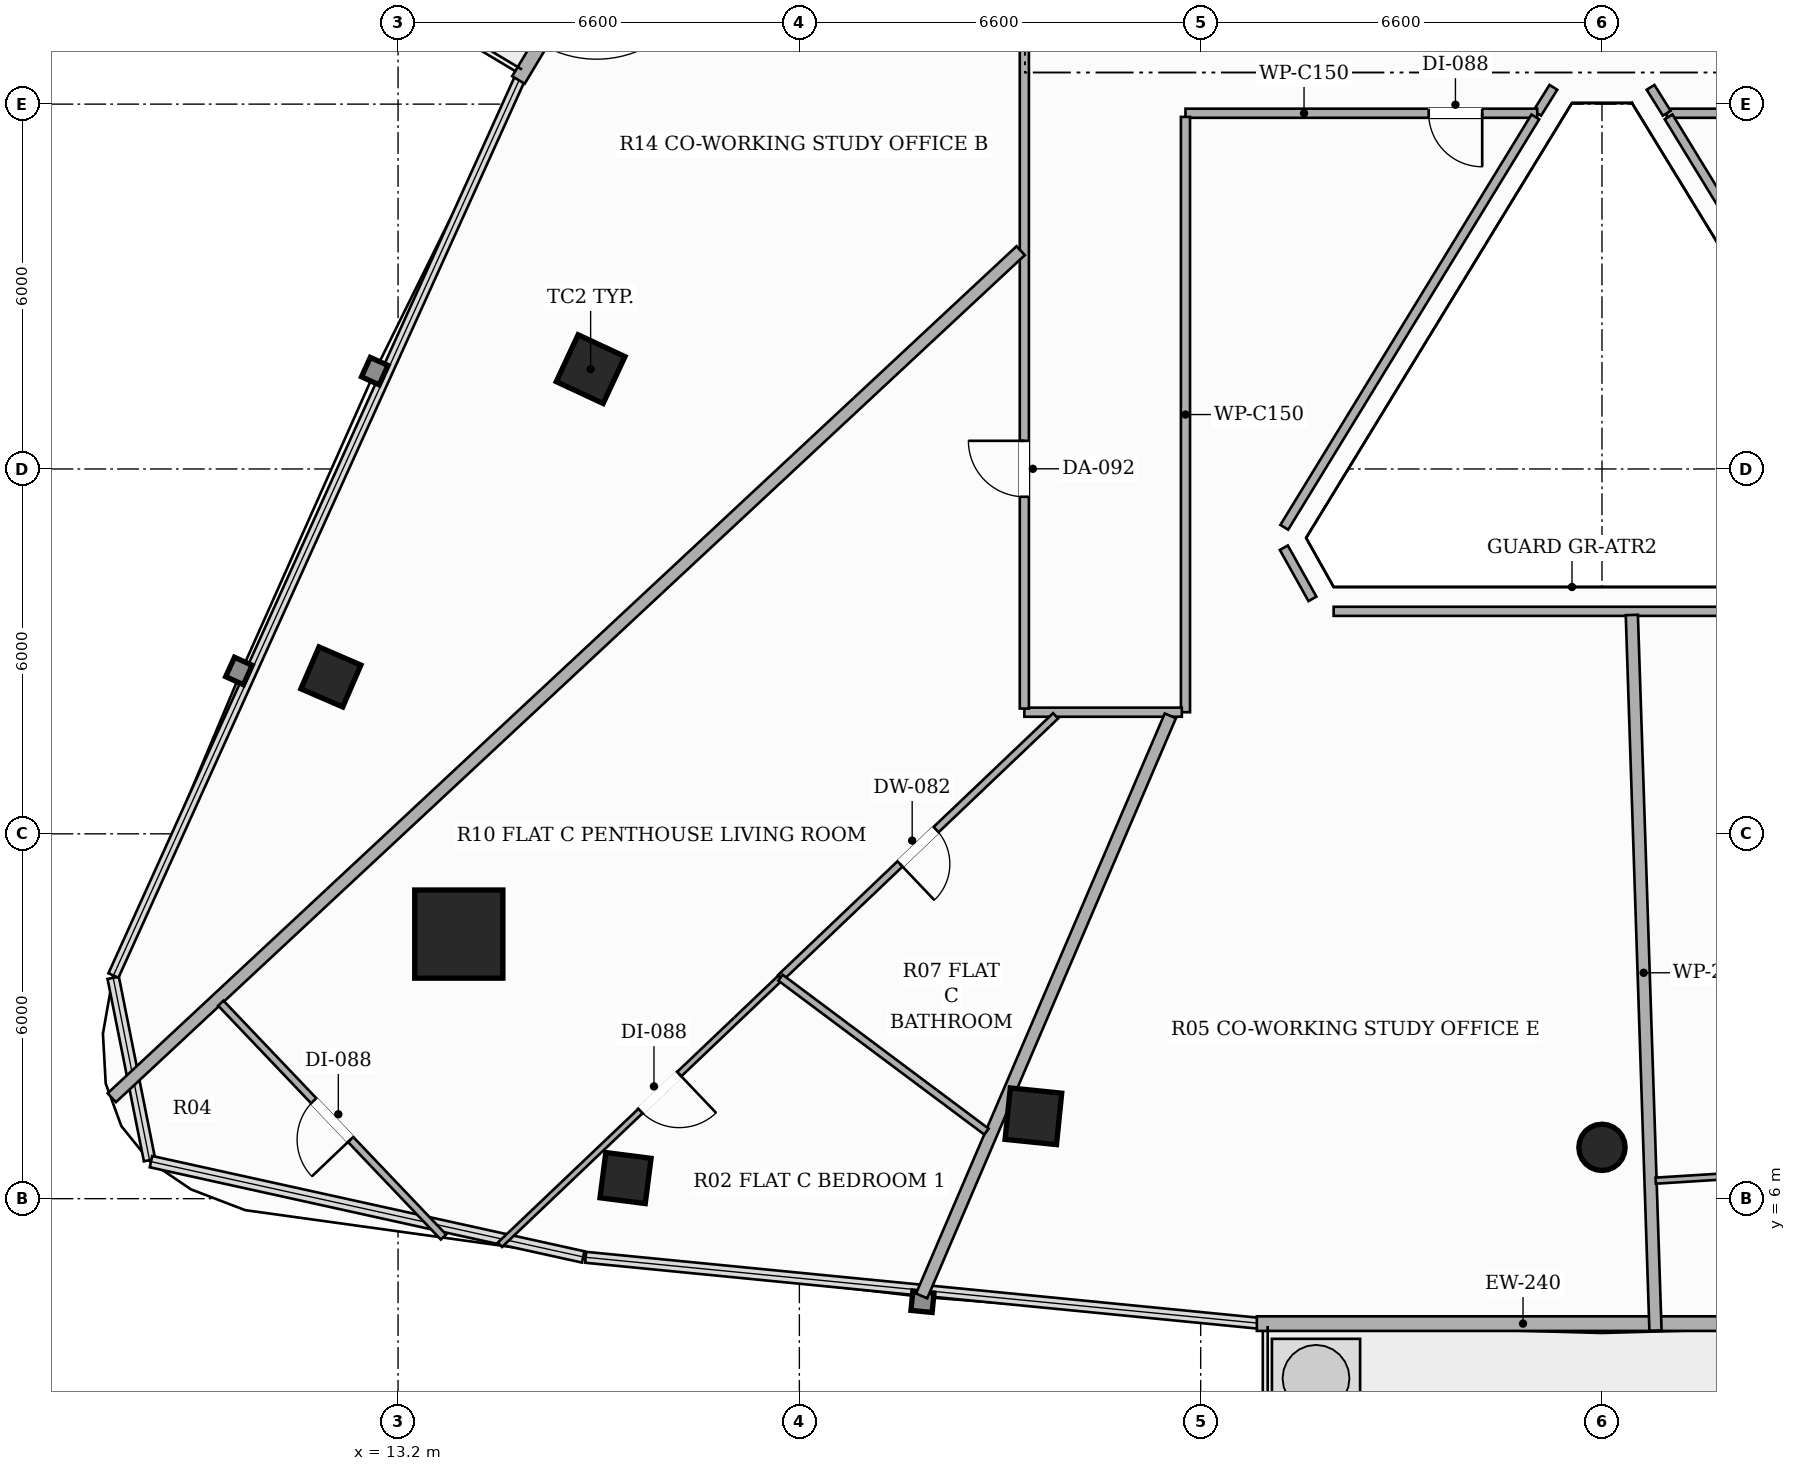
"""IFC4 building model, lengths in metres.
Left out: names, types, materials, properties, quantities, classifications, styles, units other than length and angle.
Written with IfcOpenShell. Run it as: python <this file> out.ifc"""

import sys

from ifc_helpers import new_model, si_unit, direction, frame, frame_2d, origin, origin_2d, place, context, subcontext, project, spatial, rectangle, hollow_rectangle, hollow_circle, extrude, element, fill, save


model = new_model("IFC4")
c1 = context("Model", 3, precision=1e-05, world=origin(), true_north=direction((0.0, 1.0)))
c2 = subcontext(c1, "Body", "Model", "MODEL_VIEW")
j1 = project(units=[si_unit("LENGTHUNIT", "METRE"), si_unit("PLANEANGLEUNIT", "RADIAN")], contexts=[c1])
p1 = place(None, origin())
s1 = spatial("IfcSite", under=j1, at=p1, CompositionType="ELEMENT")
p2 = place(p1, origin())
s2 = spatial("IfcBuilding", under=s1, at=p2, CompositionType="ELEMENT")
p3 = place(p2, frame((0.0, 0.0, 177.05)))
s3 = spatial("IfcBuildingStorey", under=s2, at=p3, CompositionType="ELEMENT", Elevation=177.05)
p4 = place(p3, frame((14.199, 10.351, 0.0), z_axis=(0.0, 0.0, 1.0), x_axis=(1.0, 0.0, 0.0)))
e1 = element("IfcColumn", 1, at=p4, inside=s3, PredefinedType="COLUMN", context=c2, shape_type="SweptSolid", body=[
    extrude(hollow_rectangle(XDim=1.45, YDim=1.45, WallThickness=0.045, at=origin_2d()), origin(), (0.0, 0.0, 1.0), 3.3),
])
for number, where, z_axis, x_axis in (
    (2, (16.367, 19.642, 0.0), (0.0, 0.0, 1.0), (0.423, 0.906, 0.0)),
    (3, (23.649, 7.355, 0.0), (0.0, 0.0, 1.0), (-0.995, 0.101, 0.0)),
):
    element("IfcColumn", number, at=place(p3, frame(where, z_axis=z_axis, x_axis=x_axis)), inside=s3, PredefinedType="COLUMN", context=c2, shape_type="SweptSolid", body=[
        extrude(hollow_rectangle(XDim=0.85, YDim=0.85, WallThickness=0.028, at=origin_2d()), origin(), (0.0, 0.0, 1.0), 3.3),
    ])
p5 = place(p3, frame((33.0, 6.844, 0.0), z_axis=(0.0, 0.0, 1.0), x_axis=(1.0, 0.0, 0.0)))
e4 = element("IfcColumn", 4, at=p5, inside=s3, PredefinedType="COLUMN", context=c2, shape_type="SweptSolid", body=[
    extrude(hollow_circle(Radius=0.381, WallThickness=0.022, at=origin_2d()), origin(), (0.0, 0.0, 1.0), 3.3),
])
for number, where, z_axis, x_axis in (
    (5, (12.095, 14.58, 0.0), (0.0, 0.0, 1.0), (0.397, 0.918, 0.0)),
    (6, (16.941, 6.339, 0.0), (0.0, 0.0, 1.0), (-0.992, 0.127, 0.0)),
):
    element("IfcColumn", number, at=place(p3, frame(where, z_axis=z_axis, x_axis=x_axis)), inside=s3, PredefinedType="COLUMN", context=c2, shape_type="SweptSolid", body=[
        extrude(hollow_rectangle(XDim=0.75, YDim=0.75, WallThickness=0.025, at=origin_2d()), origin(), (0.0, 0.0, 1.0), 3.3),
    ])
p6 = place(p3, frame((20.826, 33.811, 0.0), z_axis=(0.0, 0.0, 1.0), x_axis=(-0.514332213488, -0.857591029669, 0.0)))
e7 = element("IfcWall", 7, at=p6, inside=s3, PredefinedType="SOLIDWALL", context=c2, shape_type="SweptSolid", body=[
    extrude(rectangle(XDim=10.977, YDim=0.24, at=frame_2d((5.489, 0.0))), origin(), (0.0, 0.0, 1.0), 2.624),
])
p7 = place(p6, frame((8.48, 0.0, 0.0)))
e8 = element("IfcOpeningElement", 8, at=p7, cuts=e7, PredefinedType="OPENING", context=c2, shape_type="SweptSolid", body=[
    extrude(rectangle(XDim=1.8, YDim=2.2, at=frame_2d((0.9, 1.1))), frame((0.0, 0.13, 0.0), z_axis=(0.0, -1.0, 0.0), x_axis=(1.0, 0.0, 0.0)), (0.0, 0.0, 1.0), 0.26),
])
p8 = place(p3, frame((27.324, 3.945, 0.0), z_axis=(0.0, 0.0, 1.0), x_axis=(1.0, 0.0, 0.0)))
e9 = element("IfcWall", 9, at=p8, inside=s3, PredefinedType="SOLIDWALL", context=c2, shape_type="SweptSolid", body=[
    extrude(rectangle(XDim=11.352, YDim=0.24, at=frame_2d((5.676, 0.0))), origin(), (0.0, 0.0, 1.0), 2.624),
])
p9 = place(p8, frame((8.855, 0.0, 0.0)))
e10 = element("IfcOpeningElement", 10, at=p9, cuts=e9, PredefinedType="OPENING", context=c2, shape_type="SweptSolid", body=[
    extrude(rectangle(XDim=1.8, YDim=2.2, at=frame_2d((0.9, 1.1))), frame((0.0, 0.13, 0.0), z_axis=(0.0, -1.0, 0.0), x_axis=(1.0, 0.0, 0.0)), (0.0, 0.0, 1.0), 0.26),
])
p10 = place(p3, frame((32.201, 24.276, 0.0), z_axis=(0.0, 0.0, 1.0), x_axis=(-0.529649150849, -0.84821682193, 0.0)))
e11 = element("IfcWall", 11, at=p10, inside=s3, PredefinedType="PARTITIONING", context=c2, shape_type="SweptSolid", body=[
    extrude(rectangle(XDim=0.502, YDim=0.15, at=frame_2d((0.251, 0.0))), origin(), (0.0, 0.0, 1.0), 3.06),
])
p11 = place(p3, frame((31.935, 23.85, 0.0), z_axis=(0.0, 0.0, 1.0), x_axis=(-1.0, 0.0, 0.0)))
e12 = element("IfcWall", 12, at=p11, inside=s3, PredefinedType="PARTITIONING", context=c2, shape_type="SweptSolid", body=[
    extrude(rectangle(XDim=5.785, YDim=0.15, at=frame_2d((2.893, 0.0))), origin(), (0.0, 0.0, 1.0), 2.721),
])
p12 = place(p11, frame((0.905, 0.0, 0.0)))
e13 = element("IfcOpeningElement", 13, at=p12, cuts=e12, PredefinedType="OPENING", context=c2, shape_type="SweptSolid", body=[
    extrude(rectangle(XDim=0.88, YDim=2.1, at=frame_2d((0.44, 1.05))), frame((0.0, 0.085, 0.0), z_axis=(0.0, -1.0, 0.0), x_axis=(1.0, 0.0, 0.0)), (0.0, 0.0, 1.0), 0.17),
])
p13 = place(p3, frame((26.15, 23.79, 0.0), z_axis=(0.0, 0.0, 1.0), x_axis=(0.0, -1.0, 0.0)))
e14 = element("IfcWall", 14, at=p13, inside=s3, PredefinedType="PARTITIONING", context=c2, shape_type="SweptSolid", body=[
    extrude(rectangle(XDim=9.79, YDim=0.15, at=frame_2d((4.895, 0.0))), origin(), (0.0, 0.0, 1.0), 2.721),
])
p14 = place(p3, frame((26.09, 14.0, 0.0), z_axis=(0.0, 0.0, 1.0), x_axis=(-1.0, 0.0, 0.0)))
e15 = element("IfcWall", 15, at=p14, inside=s3, PredefinedType="PARTITIONING", context=c2, shape_type="SweptSolid", body=[
    extrude(rectangle(XDim=2.59, YDim=0.15, at=frame_2d((1.295, 0.0))), origin(), (0.0, 0.0, 1.0), 2.721),
])
p15 = place(p3, frame((23.5, 14.06, 0.0), z_axis=(0.0, 0.0, 1.0), x_axis=(0.0, 1.0, 0.0)))
e16 = element("IfcWall", 16, at=p15, inside=s3, PredefinedType="PARTITIONING", context=c2, shape_type="SweptSolid", body=[
    extrude(rectangle(XDim=23.457, YDim=0.15, at=frame_2d((11.729, 0.0))), origin(), (0.0, 0.0, 1.0), 2.413),
])
p16 = place(p15, frame((14.586, 0.0, 0.0)))
e17 = element("IfcOpeningElement", 17, at=p16, cuts=e16, PredefinedType="OPENING", context=c2, shape_type="SweptSolid", body=[
    extrude(rectangle(XDim=0.88, YDim=2.1, at=frame_2d((0.44, 1.05))), frame((0.0, 0.085, 0.0), z_axis=(0.0, -1.0, 0.0), x_axis=(1.0, 0.0, 0.0)), (0.0, 0.0, 1.0), 0.17),
])
p17 = place(p15, frame((3.483, 0.0, 0.0)))
e18 = element("IfcOpeningElement", 18, at=p17, cuts=e16, PredefinedType="OPENING", context=c2, shape_type="SweptSolid", body=[
    extrude(rectangle(XDim=0.92, YDim=2.15, at=frame_2d((0.46, 1.075))), frame((0.0, 0.085, 0.0), z_axis=(0.0, -1.0, 0.0), x_axis=(1.0, 0.0, 0.0)), (0.0, 0.0, 1.0), 0.17),
])
p18 = place(p3, frame((42.29, 23.85, 0.0), z_axis=(0.0, 0.0, 1.0), x_axis=(-1.0, 0.0, 0.0)))
e19 = element("IfcWall", 19, at=p18, inside=s3, PredefinedType="PARTITIONING", context=c2, shape_type="SweptSolid", body=[
    extrude(rectangle(XDim=8.225, YDim=0.15, at=frame_2d((4.113, 0.0))), origin(), (0.0, 0.0, 1.0), 2.492),
])
p19 = place(p18, frame((5.493, 0.0, 0.0)))
e20 = element("IfcOpeningElement", 20, at=p19, cuts=e19, PredefinedType="OPENING", context=c2, shape_type="SweptSolid", body=[
    extrude(rectangle(XDim=0.92, YDim=2.15, at=frame_2d((0.46, 1.075))), frame((0.0, 0.085, 0.0), z_axis=(0.0, -1.0, 0.0), x_axis=(1.0, 0.0, 0.0)), (0.0, 0.0, 1.0), 0.17),
])
p20 = place(p18, frame((2.43, 0.0, 0.0)))
e21 = element("IfcOpeningElement", 21, at=p20, cuts=e19, PredefinedType="OPENING", context=c2, shape_type="SweptSolid", body=[
    extrude(rectangle(XDim=0.82, YDim=2.1, at=frame_2d((0.41, 1.05))), frame((0.0, 0.085, 0.0), z_axis=(0.0, -1.0, 0.0), x_axis=(1.0, 0.0, 0.0)), (0.0, 0.0, 1.0), 0.17),
])
p21 = place(p18, frame((0.14, 0.0, 0.0)))
e22 = element("IfcOpeningElement", 22, at=p21, cuts=e19, PredefinedType="OPENING", context=c2, shape_type="SweptSolid", body=[
    extrude(rectangle(XDim=0.88, YDim=2.1, at=frame_2d((0.44, 1.05))), frame((0.0, 0.085, 0.0), z_axis=(0.0, -1.0, 0.0), x_axis=(1.0, 0.0, 0.0)), (0.0, 0.0, 1.0), 0.17),
])
p22 = place(p3, frame((34.065, 23.85, 0.0), z_axis=(0.0, 0.0, 1.0), x_axis=(-0.529649150849, 0.84821682193, 0.0)))
e23 = element("IfcWall", 23, at=p22, inside=s3, PredefinedType="PARTITIONING", context=c2, shape_type="SweptSolid", body=[
    extrude(rectangle(XDim=0.502, YDim=0.15, at=frame_2d((0.251, 0.0))), origin(), (0.0, 0.0, 1.0), 3.06),
])
p23 = place(p3, frame((34.096, 23.79, 0.0), z_axis=(0.0, 0.0, 1.0), x_axis=(0.521886794995, -0.853014755564, 0.0)))
e24 = element("IfcWall", 24, at=p23, inside=s3, PredefinedType="PARTITIONING", context=c2, shape_type="SweptSolid", body=[
    extrude(rectangle(XDim=7.912, YDim=0.15, at=frame_2d((3.956, 0.0))), origin(), (0.0, 0.0, 1.0), 2.721),
])
p24 = place(p3, frame((37.413, 15.659, 0.0), z_axis=(0.0, 0.0, 1.0), x_axis=(-1.0, 0.0, 0.0)))
e25 = element("IfcWall", 25, at=p24, inside=s3, PredefinedType="PARTITIONING", context=c2, shape_type="SweptSolid", body=[
    extrude(rectangle(XDim=8.826, YDim=0.15, at=frame_2d((4.413, 0.0))), origin(), (0.0, 0.0, 1.0), 2.721),
])
p25 = place(p3, frame((28.238, 15.864, 0.0), z_axis=(0.0, 0.0, 1.0), x_axis=(-0.48779296069, 0.872959350429, 0.0)))
e26 = element("IfcWall", 26, at=p25, inside=s3, PredefinedType="PARTITIONING", context=c2, shape_type="SweptSolid", body=[
    extrude(rectangle(XDim=0.963, YDim=0.15, at=frame_2d((0.482, 0.0))), origin(), (0.0, 0.0, 1.0), 3.06),
])
p26 = place(p3, frame((27.775, 17.041, 0.0), z_axis=(0.0, 0.0, 1.0), x_axis=(0.521886794995, 0.853014755564, 0.0)))
e27 = element("IfcWall", 27, at=p26, inside=s3, PredefinedType="PARTITIONING", context=c2, shape_type="SweptSolid", body=[
    extrude(rectangle(XDim=7.912, YDim=0.15, at=frame_2d((3.956, 0.0))), origin(), (0.0, 0.0, 1.0), 2.721),
])
p27 = place(p3, frame((33.88, 3.831, 0.0), z_axis=(0.0, 0.0, 1.0), x_axis=(-0.033030388285, 0.999454347857, 0.0)))
e28 = element("IfcWall", 28, at=p27, inside=s3, PredefinedType="PARTITIONING", context=c2, shape_type="SweptSolid", body=[
    extrude(rectangle(XDim=11.774, YDim=0.2, at=frame_2d((5.887, 0.0))), origin(), (0.0, 0.0, 1.0), 2.413),
])
p28 = place(p3, frame((23.44, 21.59, 0.0), z_axis=(0.0, 0.0, 1.0), x_axis=(-0.731574776166, -0.681761209572, 0.0)))
e29 = element("IfcWall", 29, at=p28, inside=s3, PredefinedType="PARTITIONING", context=c2, shape_type="SweptSolid", body=[
    extrude(rectangle(XDim=20.433, YDim=0.2, at=frame_2d((10.216, 0.0))), origin(), (0.0, 0.0, 1.0), 2.413),
])
p29 = place(p3, frame((25.901, 13.94, 0.0), z_axis=(0.0, 0.0, 1.0), x_axis=(-0.394055564824, -0.919086618242, 0.0)))
e30 = element("IfcWall", 30, at=p29, inside=s3, PredefinedType="PARTITIONING", context=c2, shape_type="SweptSolid", body=[
    extrude(rectangle(XDim=10.379, YDim=0.2, at=frame_2d((5.189, 0.0))), origin(), (0.0, 0.0, 1.0), 2.413),
])
p30 = place(p3, frame((41.446, 6.77, 0.0), z_axis=(0.0, 0.0, 1.0), x_axis=(-0.998040272182, -0.062574875979, 0.0)))
e31 = element("IfcWall", 31, at=p30, inside=s3, PredefinedType="PARTITIONING", context=c2, shape_type="SweptSolid", body=[
    extrude(rectangle(XDim=7.577, YDim=0.1, at=frame_2d((3.789, 0.0))), origin(), (0.0, 0.0, 1.0), 3.06),
])
p31 = place(p30, frame((3.378, 0.0, 0.0)))
e32 = element("IfcOpeningElement", 32, at=p31, cuts=e31, PredefinedType="OPENING", context=c2, shape_type="SweptSolid", body=[
    extrude(rectangle(XDim=0.82, YDim=2.1, at=frame_2d((0.41, 1.05))), frame((0.0, 0.06, 0.0), z_axis=(0.0, -1.0, 0.0), x_axis=(1.0, 0.0, 0.0)), (0.0, 0.0, 1.0), 0.12),
])
p32 = place(p3, frame((24.014, 13.94, 0.0), z_axis=(0.0, 0.0, 1.0), x_axis=(-0.724345202964, -0.68943747138, 0.0)))
e33 = element("IfcWall", 33, at=p32, inside=s3, PredefinedType="PARTITIONING", context=c2, shape_type="SweptSolid", body=[
    extrude(rectangle(XDim=6.246, YDim=0.12, at=frame_2d((3.123, 0.0))), origin(), (0.0, 0.0, 1.0), 2.721),
])
p33 = place(p32, frame((2.713, 0.0, 0.0)))
e34 = element("IfcOpeningElement", 34, at=p33, cuts=e33, PredefinedType="OPENING", context=c2, shape_type="SweptSolid", body=[
    extrude(rectangle(XDim=0.82, YDim=2.1, at=frame_2d((0.41, 1.05))), frame((0.0, 0.07, 0.0), z_axis=(0.0, -1.0, 0.0), x_axis=(1.0, 0.0, 0.0)), (0.0, 0.0, 1.0), 0.14),
])
p34 = place(p3, frame((13.947, 5.369, 0.0), z_axis=(0.0, 0.0, 1.0), x_axis=(-0.689563334415, 0.724225384691, 0.0)))
e35 = element("IfcWall", 35, at=p34, inside=s3, PredefinedType="PARTITIONING", context=c2, shape_type="SweptSolid", body=[
    extrude(rectangle(XDim=5.311, YDim=0.12, at=frame_2d((2.655, 0.0))), origin(), (0.0, 0.0, 1.0), 3.06),
])
p35 = place(p34, frame((2.215, 0.0, 0.0)))
e36 = element("IfcOpeningElement", 36, at=p35, cuts=e35, PredefinedType="OPENING", context=c2, shape_type="SweptSolid", body=[
    extrude(rectangle(XDim=0.88, YDim=2.1, at=frame_2d((0.44, 1.05))), frame((0.0, 0.07, 0.0), z_axis=(0.0, -1.0, 0.0), x_axis=(1.0, 0.0, 0.0)), (0.0, 0.0, 1.0), 0.14),
])
p36 = place(p3, frame((19.49, 9.634, 0.0), z_axis=(0.0, 0.0, 1.0), x_axis=(-0.724311078703, -0.68947332165, 0.0)))
e37 = element("IfcWall", 37, at=p36, inside=s3, PredefinedType="PARTITIONING", context=c2, shape_type="SweptSolid", body=[
    extrude(rectangle(XDim=6.37, YDim=0.1, at=frame_2d((3.185, 0.0))), origin(), (0.0, 0.0, 1.0), 2.413),
])
p37 = place(p36, frame((2.3, 0.0, 0.0)))
e38 = element("IfcOpeningElement", 38, at=p37, cuts=e37, PredefinedType="OPENING", context=c2, shape_type="SweptSolid", body=[
    extrude(rectangle(XDim=0.88, YDim=2.1, at=frame_2d((0.44, 1.05))), frame((0.0, 0.06, 0.0), z_axis=(0.0, -1.0, 0.0), x_axis=(1.0, 0.0, 0.0)), (0.0, 0.0, 1.0), 0.12),
])
p38 = place(p3, frame((22.877, 7.103, 0.0), z_axis=(0.0, 0.0, 1.0), x_axis=(-0.801045056039, 0.598604057951, 0.0)))
e39 = element("IfcWall", 39, at=p38, inside=s3, PredefinedType="PARTITIONING", context=c2, shape_type="SweptSolid", body=[
    extrude(rectangle(XDim=4.228, YDim=0.12, at=frame_2d((2.114, 0.0))), origin(), (0.0, 0.0, 1.0), 2.413),
])
p39 = place(p17, origin())
e40 = element("IfcDoor", 40, at=p39, inside=s3, OperationType="SINGLE_SWING_RIGHT", PredefinedType="DOOR", context=c2, shape_type="SweptSolid", body=[
    extrude(rectangle(XDim=0.92, YDim=2.15, at=frame_2d((0.46, 1.075))), frame((0.0, 0.025, 0.0), z_axis=(0.0, -1.0, 0.0), x_axis=(1.0, 0.0, 0.0)), (0.0, 0.0, 1.0), 0.05),
])
fill(e18, e40)
p40 = place(p33, origin())
e41 = element("IfcDoor", 41, at=p40, inside=s3, OperationType="SINGLE_SWING_RIGHT", PredefinedType="DOOR", context=c2, shape_type="SweptSolid", body=[
    extrude(rectangle(XDim=0.82, YDim=2.1, at=frame_2d((0.41, 1.05))), frame((0.0, 0.025, 0.0), z_axis=(0.0, -1.0, 0.0), x_axis=(1.0, 0.0, 0.0)), (0.0, 0.0, 1.0), 0.05),
])
fill(e34, e41)
p41 = place(p35, origin())
e42 = element("IfcDoor", 42, at=p41, inside=s3, OperationType="SINGLE_SWING_LEFT", PredefinedType="DOOR", context=c2, shape_type="SweptSolid", body=[
    extrude(rectangle(XDim=0.88, YDim=2.1, at=frame_2d((0.44, 1.05))), frame((0.0, 0.025, 0.0), z_axis=(0.0, -1.0, 0.0), x_axis=(1.0, 0.0, 0.0)), (0.0, 0.0, 1.0), 0.05),
])
fill(e36, e42)
p42 = place(p37, origin())
e43 = element("IfcDoor", 43, at=p42, inside=s3, OperationType="SINGLE_SWING_LEFT", PredefinedType="DOOR", context=c2, shape_type="SweptSolid", body=[
    extrude(rectangle(XDim=0.88, YDim=2.1, at=frame_2d((0.44, 1.05))), frame((0.0, 0.025, 0.0), z_axis=(0.0, -1.0, 0.0), x_axis=(1.0, 0.0, 0.0)), (0.0, 0.0, 1.0), 0.05),
])
fill(e38, e43)
p43 = place(p12, origin())
e44 = element("IfcDoor", 44, at=p43, inside=s3, OperationType="SINGLE_SWING_LEFT", PredefinedType="DOOR", context=c2, shape_type="SweptSolid", body=[
    extrude(rectangle(XDim=0.88, YDim=2.1, at=frame_2d((0.44, 1.05))), frame((0.0, 0.025, 0.0), z_axis=(0.0, -1.0, 0.0), x_axis=(1.0, 0.0, 0.0)), (0.0, 0.0, 1.0), 0.05),
])
fill(e13, e44)
save(model, sys.argv[1])
